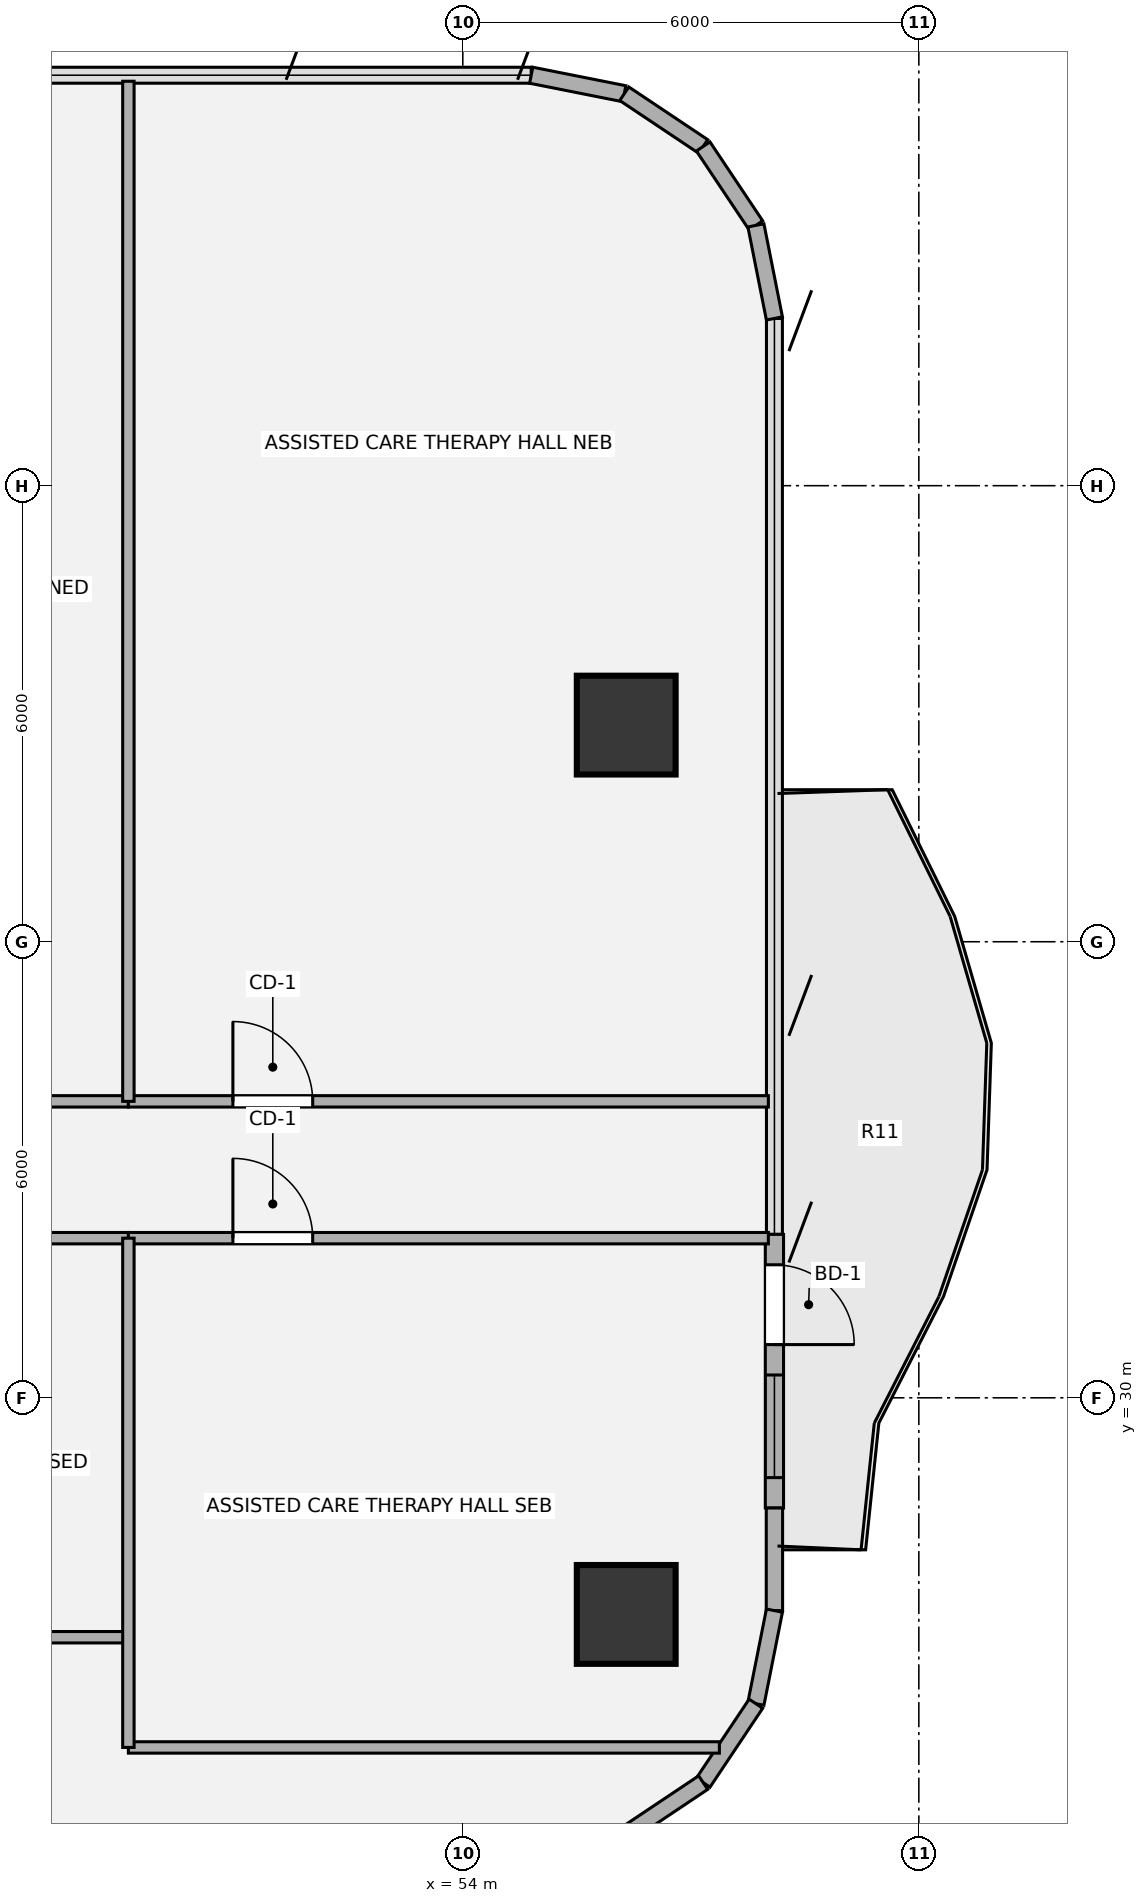
"""IFC4 building model, lengths in metres.
Left out: names, types, materials, properties, quantities, classifications, styles, units other than length and angle.
Written with IfcOpenShell. Run it as: python <this file> out.ifc"""

import sys

from ifc_helpers import new_model, si_unit, direction, frame, frame_2d, origin, origin_2d, place, context, subcontext, project, spatial, rectangle, hollow_circle, extrude, source, transform, mapped, element, fill, save


model = new_model("IFC4")
c1 = context("Model", 3, precision=1e-05, world=origin(), true_north=direction((0.0, 1.0)))
c2 = subcontext(c1, "Body", "Model", "MODEL_VIEW")
j1 = project(units=[si_unit("LENGTHUNIT", "METRE"), si_unit("PLANEANGLEUNIT", "RADIAN")], contexts=[c1])
p1 = place(None, origin())
s1 = spatial("IfcSite", under=j1, at=p1, CompositionType="ELEMENT")
p2 = place(p1, origin())
s2 = spatial("IfcBuilding", under=s1, at=p2, CompositionType="ELEMENT")
p3 = place(p2, frame((0.0, 0.0, 101.16)))
s3 = spatial("IfcBuildingStorey", under=s2, at=p3, CompositionType="ELEMENT", Elevation=101.16)
m1 = source(origin(), c2, "Body", "SweptSolid", [
    extrude(hollow_circle(Radius=0.65, WallThickness=0.045, at=origin_2d()), origin(), (0.0, 0.0, 1.0), 3.78),
])
for number, where, z_axis, x_axis in (
    (1, (56.15, 27.15, 0.0), (0.0, 0.0, 1.0), (1.0, 0.0, 0.0)),
    (2, (56.15, 38.85, 0.0), (0.0, 0.0, 1.0), (1.0, 0.0, 0.0)),
):
    element("IfcColumn", number, at=place(p3, frame(where, z_axis=z_axis, x_axis=x_axis)), inside=s3, PredefinedType="COLUMN", context=c2, shape_type="MappedRepresentation", body=[
        mapped(m1, transform((0.0, 0.0, 0.0), x_axis=(1.0, 0.0, 0.0), y_axis=(0.0, 1.0, 0.0), z_axis=(0.0, 0.0, 1.0), scale=1.0)),
    ])
for number, where, z_axis, x_axis in (
    (3, (54.9, 47.4, 0.0), (0.0, 0.0, 1.0), (0.981, -0.195, 0.0)),
    (4, (56.125, 47.156, 0.0), (0.0, 0.0, 1.0), (0.831, -0.556, 0.0)),
    (5, (57.163, 46.463, 0.0), (0.0, 0.0, 1.0), (0.556, -0.831, 0.0)),
    (6, (57.856, 45.425, 0.0), (0.0, 0.0, 1.0), (0.195, -0.981, 0.0)),
):
    element("IfcWall", number, at=place(p3, frame(where, z_axis=z_axis, x_axis=x_axis)), inside=s3, PredefinedType="SOLIDWALL", context=c2, shape_type="SweptSolid", body=[
        extrude(rectangle(XDim=1.249, YDim=0.215, at=frame_2d((0.624, 0.0))), origin(), (0.0, 0.0, 1.0), 3.53),
    ])
p4 = place(p3, frame((58.1, 32.15, 0.0), z_axis=(0.0, 0.0, 1.0), x_axis=(0.0, -1.0, 0.0)))
e7 = element("IfcWall", 7, at=p4, inside=s3, PredefinedType="SOLIDWALL", context=c2, shape_type="SweptSolid", body=[
    extrude(rectangle(XDim=3.6, YDim=0.24, at=frame_2d((1.8, 0.0))), origin(), (0.0, 0.0, 1.0), 3.53),
])
p5 = place(p4, frame((0.4, 0.0, 0.0)))
e8 = element("IfcOpeningElement", 8, at=p5, cuts=e7, PredefinedType="OPENING", context=c2, shape_type="SweptSolid", body=[
    extrude(rectangle(XDim=1.05, YDim=2.15, at=origin_2d()), frame((0.525, 0.13, 1.075), z_axis=(0.0, -1.0, 0.0), x_axis=(1.0, 0.0, 0.0)), (0.0, 0.0, 1.0), 0.26),
])
p6 = place(p4, frame((1.85, 0.0, 0.85)))
e9 = element("IfcOpeningElement", 9, at=p6, cuts=e7, PredefinedType="OPENING", context=c2, shape_type="SweptSolid", body=[
    extrude(rectangle(XDim=1.35, YDim=1.35, at=origin_2d()), frame((0.675, 0.13, 0.675), z_axis=(0.0, -1.0, 0.0), x_axis=(1.0, 0.0, 0.0)), (0.0, 0.0, 1.0), 0.26),
])
p7 = place(p3, frame((58.1, 28.55, 0.0), z_axis=(0.0, 0.0, 1.0), x_axis=(0.0, -1.0, 0.0)))
e10 = element("IfcWall", 10, at=p7, inside=s3, PredefinedType="SOLIDWALL", context=c2, shape_type="SweptSolid", body=[
    extrude(rectangle(XDim=1.35, YDim=0.215, at=frame_2d((0.675, 0.0))), origin(), (0.0, 0.0, 1.0), 3.53),
])
for number, where, z_axis, x_axis in (
    (11, (58.1, 27.2, 0.0), (0.0, 0.0, 1.0), (-0.195, -0.981, 0.0)),
    (12, (57.856, 25.975, 0.0), (0.0, 0.0, 1.0), (-0.556, -0.831, 0.0)),
    (13, (57.163, 24.937, 0.0), (0.0, 0.0, 1.0), (-0.831, -0.556, 0.0)),
):
    element("IfcWall", number, at=place(p3, frame(where, z_axis=z_axis, x_axis=x_axis)), inside=s3, PredefinedType="SOLIDWALL", context=c2, shape_type="SweptSolid", body=[
        extrude(rectangle(XDim=1.249, YDim=0.215, at=frame_2d((0.624, 0.0))), origin(), (0.0, 0.0, 1.0), 3.53),
    ])
p8 = place(p3, frame((49.6, 25.4, 0.0), z_axis=(0.0, 0.0, 1.0), x_axis=(1.0, 0.0, 0.0)))
e14 = element("IfcWall", 14, at=p8, inside=s3, PredefinedType="PARTITIONING", context=c2, shape_type="SweptSolid", body=[
    extrude(rectangle(XDim=7.776, YDim=0.15, at=frame_2d((3.888, 0.0))), origin(), (0.0, 0.0, 1.0), 3.5),
])
p9 = place(p3, frame((44.4, 26.85, 0.0), z_axis=(0.0, 0.0, 1.0), x_axis=(1.0, 0.0, 0.0)))
e15 = element("IfcWall", 15, at=p9, inside=s3, PredefinedType="PARTITIONING", context=c2, shape_type="SweptSolid", body=[
    extrude(rectangle(XDim=5.2, YDim=0.15, at=frame_2d((2.6, 0.0))), origin(), (0.0, 0.0, 1.0), 3.055),
])
p10 = place(p3, frame((44.4, 32.1, 0.0), z_axis=(0.0, 0.0, 1.0), x_axis=(1.0, 0.0, 0.0)))
e16 = element("IfcWall", 16, at=p10, inside=s3, PredefinedType="PARTITIONING", context=c2, shape_type="SweptSolid", body=[
    extrude(rectangle(XDim=5.2, YDim=0.15, at=frame_2d((2.6, 0.0))), origin(), (0.0, 0.0, 1.0), 2.982),
])
p11 = place(p10, frame((2.075, 0.0, 0.0)))
e17 = element("IfcOpeningElement", 17, at=p11, cuts=e16, PredefinedType="OPENING", context=c2, shape_type="SweptSolid", body=[
    extrude(rectangle(XDim=1.05, YDim=2.1, at=origin_2d()), frame((0.525, 0.085, 1.05), z_axis=(0.0, -1.0, 0.0), x_axis=(1.0, 0.0, 0.0)), (0.0, 0.0, 1.0), 0.17),
])
p12 = place(p3, frame((49.6, 32.1, 0.0), z_axis=(0.0, 0.0, 1.0), x_axis=(1.0, 0.0, 0.0)))
e18 = element("IfcWall", 18, at=p12, inside=s3, PredefinedType="PARTITIONING", context=c2, shape_type="SweptSolid", body=[
    extrude(rectangle(XDim=8.42, YDim=0.15, at=frame_2d((4.21, 0.0))), origin(), (0.0, 0.0, 1.0), 2.982),
])
p13 = place(p12, frame((1.375, 0.0, 0.0)))
e19 = element("IfcOpeningElement", 19, at=p13, cuts=e18, PredefinedType="OPENING", context=c2, shape_type="SweptSolid", body=[
    extrude(rectangle(XDim=1.05, YDim=2.1, at=origin_2d()), frame((0.525, 0.085, 1.05), z_axis=(0.0, -1.0, 0.0), x_axis=(1.0, 0.0, 0.0)), (0.0, 0.0, 1.0), 0.17),
])
p14 = place(p3, frame((44.4, 33.9, 0.0), z_axis=(0.0, 0.0, 1.0), x_axis=(1.0, 0.0, 0.0)))
e20 = element("IfcWall", 20, at=p14, inside=s3, PredefinedType="PARTITIONING", context=c2, shape_type="SweptSolid", body=[
    extrude(rectangle(XDim=5.2, YDim=0.15, at=frame_2d((2.6, 0.0))), origin(), (0.0, 0.0, 1.0), 2.982),
])
p15 = place(p14, frame((2.075, 0.0, 0.0)))
e21 = element("IfcOpeningElement", 21, at=p15, cuts=e20, PredefinedType="OPENING", context=c2, shape_type="SweptSolid", body=[
    extrude(rectangle(XDim=1.05, YDim=2.1, at=origin_2d()), frame((0.525, 0.085, 1.05), z_axis=(0.0, -1.0, 0.0), x_axis=(1.0, 0.0, 0.0)), (0.0, 0.0, 1.0), 0.17),
])
p16 = place(p3, frame((49.6, 33.9, 0.0), z_axis=(0.0, 0.0, 1.0), x_axis=(1.0, 0.0, 0.0)))
e22 = element("IfcWall", 22, at=p16, inside=s3, PredefinedType="PARTITIONING", context=c2, shape_type="SweptSolid", body=[
    extrude(rectangle(XDim=8.42, YDim=0.15, at=frame_2d((4.21, 0.0))), origin(), (0.0, 0.0, 1.0), 2.982),
])
p17 = place(p16, frame((1.375, 0.0, 0.0)))
e23 = element("IfcOpeningElement", 23, at=p17, cuts=e22, PredefinedType="OPENING", context=c2, shape_type="SweptSolid", body=[
    extrude(rectangle(XDim=1.05, YDim=2.1, at=origin_2d()), frame((0.525, 0.085, 1.05), z_axis=(0.0, -1.0, 0.0), x_axis=(1.0, 0.0, 0.0)), (0.0, 0.0, 1.0), 0.17),
])
p18 = place(p3, frame((49.6, 25.4, 0.0), z_axis=(0.0, 0.0, 1.0), x_axis=(0.0, 1.0, 0.0)))
e24 = element("IfcWall", 24, at=p18, inside=s3, PredefinedType="PARTITIONING", context=c2, shape_type="SweptSolid", body=[
    extrude(rectangle(XDim=6.7, YDim=0.15, at=frame_2d((3.35, 0.0))), origin(), (0.0, 0.0, 1.0), 3.5),
])
p19 = place(p3, frame((49.6, 33.9, 0.0), z_axis=(0.0, 0.0, 1.0), x_axis=(0.0, 1.0, 0.0)))
e25 = element("IfcWall", 25, at=p19, inside=s3, PredefinedType="PARTITIONING", context=c2, shape_type="SweptSolid", body=[
    extrude(rectangle(XDim=13.421, YDim=0.15, at=frame_2d((6.71, 0.0))), origin(), (0.0, 0.0, 1.0), 3.5),
])
m2 = source(origin(), c2, "Body", "SweptSolid", [
    extrude(rectangle(XDim=1.05, YDim=2.15, at=origin_2d()), frame((0.525, 0.025, 1.075), z_axis=(0.0, -1.0, 0.0), x_axis=(1.0, 0.0, 0.0)), (0.0, 0.0, 1.0), 0.05),
])
p20 = place(p5, origin())
e26 = element("IfcDoor", 26, at=p20, inside=s3, OperationType="SINGLE_SWING_RIGHT", PredefinedType="DOOR", context=c2, shape_type="MappedRepresentation", body=[
    mapped(m2, transform((0.0, 0.0, 0.0), x_axis=(1.0, 0.0, 0.0), y_axis=(0.0, 1.0, 0.0), z_axis=(0.0, 0.0, 1.0), scale=1.0)),
])
fill(e8, e26)
m3 = source(origin(), c2, "Body", "SweptSolid", [
    extrude(rectangle(XDim=1.35, YDim=1.35, at=origin_2d()), frame((0.675, 0.03, 0.675), z_axis=(0.0, -1.0, 0.0), x_axis=(1.0, 0.0, 0.0)), (0.0, 0.0, 1.0), 0.06),
])
p21 = place(p6, origin())
e27 = element("IfcWindow", 27, at=p21, inside=s3, PartitioningType="SINGLE_PANEL", PredefinedType="WINDOW", context=c2, shape_type="MappedRepresentation", body=[
    mapped(m3, transform((0.0, 0.0, 0.0), x_axis=(1.0, 0.0, 0.0), y_axis=(0.0, 1.0, 0.0), z_axis=(0.0, 0.0, 1.0), scale=1.0)),
])
fill(e9, e27)
m4 = source(origin(), c2, "Body", "SweptSolid", [
    extrude(rectangle(XDim=1.05, YDim=2.1, at=origin_2d()), frame((0.525, 0.025, 1.05), z_axis=(0.0, -1.0, 0.0), x_axis=(1.0, 0.0, 0.0)), (0.0, 0.0, 1.0), 0.05),
])
p22 = place(p13, origin())
e28 = element("IfcDoor", 28, at=p22, inside=s3, OperationType="SINGLE_SWING_LEFT", PredefinedType="DOOR", context=c2, shape_type="MappedRepresentation", body=[
    mapped(m4, transform((0.0, 0.0, 0.0), x_axis=(1.0, 0.0, 0.0), y_axis=(0.0, 1.0, 0.0), z_axis=(0.0, 0.0, 1.0), scale=1.0)),
])
fill(e19, e28)
p23 = place(p17, origin())
e29 = element("IfcDoor", 29, at=p23, inside=s3, OperationType="SINGLE_SWING_LEFT", PredefinedType="DOOR", context=c2, shape_type="MappedRepresentation", body=[
    mapped(m4, transform((0.0, 0.0, 0.0), x_axis=(1.0, 0.0, 0.0), y_axis=(0.0, 1.0, 0.0), z_axis=(0.0, 0.0, 1.0), scale=1.0)),
])
fill(e23, e29)
save(model, sys.argv[1])
